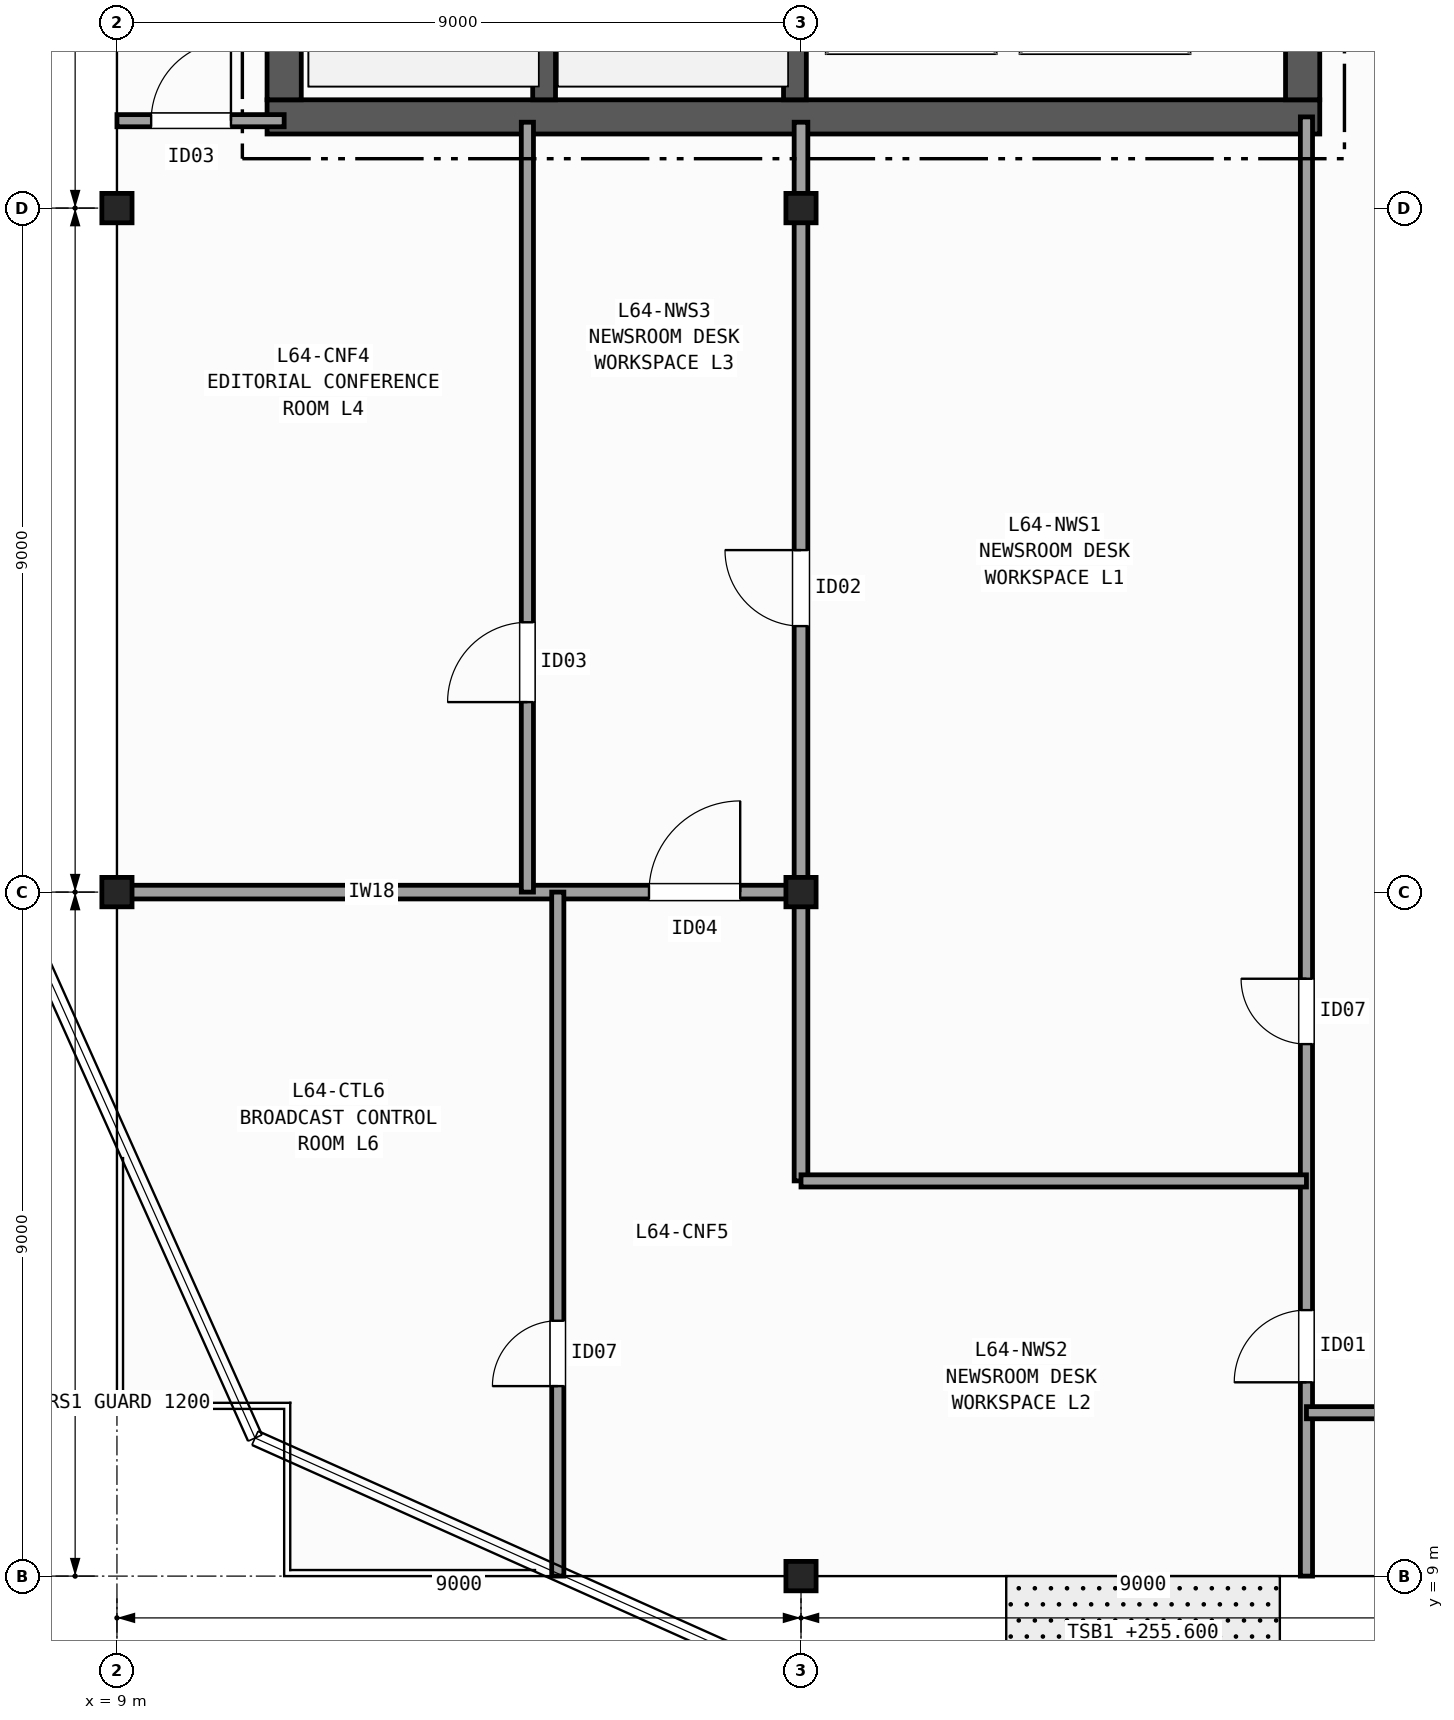
"""IFC4 building model, lengths in metres.
Left out: names, types, materials, properties, quantities, classifications, styles, units other than length and angle.
Written with IfcOpenShell. Run it as: python <this file> out.ifc"""

import sys

from ifc_helpers import new_model, si_unit, direction, frame, frame_2d, origin, origin_2d, place, context, subcontext, project, spatial, rectangle, i_section, extrude, element, fill, save


model = new_model("IFC4")
c1 = context("Model", 3, precision=1e-05, world=origin(), true_north=direction((0.0, 1.0)))
c2 = subcontext(c1, "Body", "Model", "MODEL_VIEW")
j1 = project(units=[si_unit("LENGTHUNIT", "METRE"), si_unit("PLANEANGLEUNIT", "RADIAN")], contexts=[c1])
p1 = place(None, origin())
s1 = spatial("IfcSite", under=j1, at=p1, CompositionType="ELEMENT")
p2 = place(p1, origin())
s2 = spatial("IfcBuilding", under=s1, at=p2, CompositionType="ELEMENT")
p3 = place(p2, frame((0.0, 0.0, 255.6)))
s3 = spatial("IfcBuildingStorey", under=s2, at=p3, CompositionType="ELEMENT", Elevation=255.6)
for number, where, z_axis, x_axis in (
    (1, (9.0, 18.0, 0.0), (0.0, 0.0, 1.0), (1.0, 0.0, 0.0)),
    (2, (9.0, 27.0, 0.0), (0.0, 0.0, 1.0), (1.0, 0.0, 0.0)),
    (3, (18.0, 9.0, 0.0), (0.0, 0.0, 1.0), (1.0, 0.0, 0.0)),
    (4, (18.0, 18.0, 0.0), (0.0, 0.0, 1.0), (1.0, 0.0, 0.0)),
    (5, (18.0, 27.0, 0.0), (0.0, 0.0, 1.0), (1.0, 0.0, 0.0)),
):
    element("IfcColumn", number, at=place(p3, frame(where, z_axis=z_axis, x_axis=x_axis)), inside=s3, PredefinedType="COLUMN", context=c2, shape_type="SweptSolid", body=[
        extrude(i_section(OverallWidth=0.397, OverallDepth=0.387, WebThickness=0.021, FlangeThickness=0.033, FilletRadius=0.015, at=origin_2d()), origin(), (0.0, 0.0, 1.0), 3.7),
    ])
p4 = place(p3, frame((10.975, 28.2, 0.0), z_axis=(0.0, 0.0, 1.0), x_axis=(1.0, 0.0, 0.0)))
e6 = element("IfcWall", 6, at=p4, inside=s3, PredefinedType="SHEAR", context=c2, shape_type="SweptSolid", body=[
    extrude(rectangle(XDim=13.85, YDim=0.45, at=frame_2d((6.925, 0.0))), origin(), (0.0, 0.0, 1.0), 3.42),
])
p5 = place(p3, frame((11.2, 42.175, 0.0), z_axis=(0.0, 0.0, 1.0), x_axis=(0.0, -1.0, 0.0)))
e7 = element("IfcWall", 7, at=p5, inside=s3, PredefinedType="SHEAR", context=c2, shape_type="SweptSolid", body=[
    extrude(rectangle(XDim=13.75, YDim=0.45, at=frame_2d((6.875, 0.0))), origin(), (0.0, 0.0, 1.0), 3.42),
])
p6 = place(p3, frame((24.6, 28.425, 0.0), z_axis=(0.0, 0.0, 1.0), x_axis=(0.0, 1.0, 0.0)))
e8 = element("IfcWall", 8, at=p6, inside=s3, PredefinedType="SHEAR", context=c2, shape_type="SweptSolid", body=[
    extrude(rectangle(XDim=13.75, YDim=0.45, at=frame_2d((6.875, 0.0))), origin(), (0.0, 0.0, 1.0), 3.42),
])
p7 = place(p6, frame((3.375, 0.0, 0.0)))
e9 = element("IfcOpeningElement", 9, at=p7, cuts=e8, PredefinedType="OPENING", context=c2, shape_type="SweptSolid", body=[
    extrude(rectangle(XDim=1.5, YDim=2.2, at=frame_2d((0.75, 1.1))), frame((0.0, 0.235, 0.0), z_axis=(0.0, -1.0, 0.0), x_axis=(1.0, 0.0, 0.0)), (0.0, 0.0, 1.0), 0.47),
])
p8 = place(p6, frame((9.975, 0.0, 0.0)))
e10 = element("IfcOpeningElement", 10, at=p8, cuts=e8, PredefinedType="OPENING", context=c2, shape_type="SweptSolid", body=[
    extrude(rectangle(XDim=0.9, YDim=2.1, at=frame_2d((0.45, 1.05))), frame((0.0, 0.235, 0.0), z_axis=(0.0, -1.0, 0.0), x_axis=(1.0, 0.0, 0.0)), (0.0, 0.0, 1.0), 0.47),
])
p9 = place(p3, frame((14.62, 28.425, 0.0), z_axis=(0.0, 0.0, 1.0), x_axis=(0.0, 1.0, 0.0)))
e11 = element("IfcWall", 11, at=p9, inside=s3, PredefinedType="SHEAR", context=c2, shape_type="SweptSolid", body=[
    extrude(rectangle(XDim=9.025, YDim=0.3, at=frame_2d((4.512, 0.0))), origin(), (0.0, 0.0, 1.0), 3.42),
])
p10 = place(p3, frame((17.92, 42.175, 0.0), z_axis=(0.0, 0.0, 1.0), x_axis=(0.0, -1.0, 0.0)))
e12 = element("IfcWall", 12, at=p10, inside=s3, PredefinedType="SHEAR", context=c2, shape_type="SweptSolid", body=[
    extrude(rectangle(XDim=13.75, YDim=0.3, at=frame_2d((6.875, 0.0))), origin(), (0.0, 0.0, 1.0), 3.42),
])
p11 = place(p10, frame((2.0, 0.0, 0.0)))
e13 = element("IfcOpeningElement", 13, at=p11, cuts=e12, PredefinedType="OPENING", context=c2, shape_type="SweptSolid", body=[
    extrude(rectangle(XDim=1.15, YDim=2.15, at=frame_2d((0.575, 1.075))), frame((0.0, 0.16, 0.0), z_axis=(0.0, -1.0, 0.0), x_axis=(1.0, 0.0, 0.0)), (0.0, 0.0, 1.0), 0.32),
])
p12 = place(p3, frame((9.0, 28.15, 0.0), z_axis=(0.0, 0.0, 1.0), x_axis=(1.0, 0.0, 0.0)))
e14 = element("IfcWall", 14, at=p12, inside=s3, PredefinedType="PARTITIONING", context=c2, shape_type="SweptSolid", body=[
    extrude(rectangle(XDim=2.2, YDim=0.16, at=frame_2d((1.1, 0.0))), origin(), (0.0, 0.0, 1.0), 2.707),
])
p13 = place(p12, frame((0.45, 0.0, 0.0)))
e15 = element("IfcOpeningElement", 15, at=p13, cuts=e14, PredefinedType="OPENING", context=c2, shape_type="SweptSolid", body=[
    extrude(rectangle(XDim=1.05, YDim=2.15, at=frame_2d((0.525, 1.075))), frame((0.0, 0.09, 0.0), z_axis=(0.0, -1.0, 0.0), x_axis=(1.0, 0.0, 0.0)), (0.0, 0.0, 1.0), 0.18),
])
p14 = place(p3, frame((24.65, 9.0, 0.0), z_axis=(0.0, 0.0, 1.0), x_axis=(0.0, 1.0, 0.0)))
e16 = element("IfcWall", 16, at=p14, inside=s3, PredefinedType="PARTITIONING", context=c2, shape_type="SweptSolid", body=[
    extrude(rectangle(XDim=19.2, YDim=0.16, at=frame_2d((9.6, 0.0))), origin(), (0.0, 0.0, 1.0), 2.707),
])
p15 = place(p14, frame((7.0, 0.0, 0.0)))
e17 = element("IfcOpeningElement", 17, at=p15, cuts=e16, PredefinedType="OPENING", context=c2, shape_type="SweptSolid", body=[
    extrude(rectangle(XDim=0.86, YDim=2.05, at=frame_2d((0.43, 1.025))), frame((0.0, 0.09, 0.0), z_axis=(0.0, -1.0, 0.0), x_axis=(1.0, 0.0, 0.0)), (0.0, 0.0, 1.0), 0.18),
])
p16 = place(p14, frame((2.55, 0.0, 0.0)))
e18 = element("IfcOpeningElement", 18, at=p16, cuts=e16, PredefinedType="OPENING", context=c2, shape_type="SweptSolid", body=[
    extrude(rectangle(XDim=0.95, YDim=2.1, at=frame_2d((0.475, 1.05))), frame((0.0, 0.09, 0.0), z_axis=(0.0, -1.0, 0.0), x_axis=(1.0, 0.0, 0.0)), (0.0, 0.0, 1.0), 0.18),
])
p17 = place(p3, frame((9.0, 18.0, 0.0), z_axis=(0.0, 0.0, 1.0), x_axis=(1.0, 0.0, 0.0)))
e19 = element("IfcWall", 19, at=p17, inside=s3, PredefinedType="PARTITIONING", context=c2, shape_type="SweptSolid", body=[
    extrude(rectangle(XDim=9.08, YDim=0.18, at=frame_2d((4.54, 0.0))), origin(), (0.0, 0.0, 1.0), 2.707),
])
p18 = place(p17, frame((7.0, 0.0, 0.0)))
e20 = element("IfcOpeningElement", 20, at=p18, cuts=e19, PredefinedType="OPENING", context=c2, shape_type="SweptSolid", body=[
    extrude(rectangle(XDim=1.2, YDim=2.15, at=frame_2d((0.6, 1.075))), frame((0.0, 0.1, 0.0), z_axis=(0.0, -1.0, 0.0), x_axis=(1.0, 0.0, 0.0)), (0.0, 0.0, 1.0), 0.2),
])
p19 = place(p3, frame((18.0, 14.2, 0.0), z_axis=(0.0, 0.0, 1.0), x_axis=(0.0, 1.0, 0.0)))
e21 = element("IfcWall", 21, at=p19, inside=s3, PredefinedType="PARTITIONING", context=c2, shape_type="SweptSolid", body=[
    extrude(rectangle(XDim=13.93, YDim=0.18, at=frame_2d((6.965, 0.0))), origin(), (0.0, 0.0, 1.0), 2.789),
])
p20 = place(p19, frame((7.3, 0.0, 0.0)))
e22 = element("IfcOpeningElement", 22, at=p20, cuts=e21, PredefinedType="OPENING", context=c2, shape_type="SweptSolid", body=[
    extrude(rectangle(XDim=1.0, YDim=2.1, at=frame_2d((0.5, 1.05))), frame((0.0, 0.1, 0.0), z_axis=(0.0, -1.0, 0.0), x_axis=(1.0, 0.0, 0.0)), (0.0, 0.0, 1.0), 0.2),
])
p21 = place(p3, frame((18.0, 14.2, 0.0), z_axis=(0.0, 0.0, 1.0), x_axis=(1.0, 0.0, 0.0)))
e23 = element("IfcWall", 23, at=p21, inside=s3, PredefinedType="PARTITIONING", context=c2, shape_type="SweptSolid", body=[
    extrude(rectangle(XDim=6.65, YDim=0.16, at=frame_2d((3.325, 0.0))), origin(), (0.0, 0.0, 1.0), 2.792),
])
p22 = place(p3, frame((14.4, 18.0, 0.0), z_axis=(0.0, 0.0, 1.0), x_axis=(0.0, 1.0, 0.0)))
e24 = element("IfcWall", 24, at=p22, inside=s3, PredefinedType="PARTITIONING", context=c2, shape_type="SweptSolid", body=[
    extrude(rectangle(XDim=10.13, YDim=0.16, at=frame_2d((5.065, 0.0))), origin(), (0.0, 0.0, 1.0), 2.789),
])
p23 = place(p22, frame((2.5, 0.0, 0.0)))
e25 = element("IfcOpeningElement", 25, at=p23, cuts=e24, PredefinedType="OPENING", context=c2, shape_type="SweptSolid", body=[
    extrude(rectangle(XDim=1.05, YDim=2.15, at=frame_2d((0.525, 1.075))), frame((0.0, 0.09, 0.0), z_axis=(0.0, -1.0, 0.0), x_axis=(1.0, 0.0, 0.0)), (0.0, 0.0, 1.0), 0.18),
])
p24 = place(p3, frame((14.8, 9.0, 0.0), z_axis=(0.0, 0.0, 1.0), x_axis=(0.0, 1.0, 0.0)))
e26 = element("IfcWall", 26, at=p24, inside=s3, PredefinedType="PARTITIONING", context=c2, shape_type="SweptSolid", body=[
    extrude(rectangle(XDim=9.0, YDim=0.16, at=frame_2d((4.5, 0.0))), origin(), (0.0, 0.0, 1.0), 2.789),
])
p25 = place(p24, frame((2.5, 0.0, 0.0)))
e27 = element("IfcOpeningElement", 27, at=p25, cuts=e26, PredefinedType="OPENING", context=c2, shape_type="SweptSolid", body=[
    extrude(rectangle(XDim=0.86, YDim=2.05, at=frame_2d((0.43, 1.025))), frame((0.0, 0.09, 0.0), z_axis=(0.0, -1.0, 0.0), x_axis=(1.0, 0.0, 0.0)), (0.0, 0.0, 1.0), 0.18),
])
p26 = place(p3, frame((24.65, 11.15, 0.0), z_axis=(0.0, 0.0, 1.0), x_axis=(1.0, 0.0, 0.0)))
e28 = element("IfcWall", 28, at=p26, inside=s3, PredefinedType="PARTITIONING", context=c2, shape_type="SweptSolid", body=[
    extrude(rectangle(XDim=4.75, YDim=0.16, at=frame_2d((2.375, 0.0))), origin(), (0.0, 0.0, 1.0), 2.792),
])
p27 = place(p26, frame((1.2, 0.0, 0.0)))
e29 = element("IfcOpeningElement", 29, at=p27, cuts=e28, PredefinedType="OPENING", context=c2, shape_type="SweptSolid", body=[
    extrude(rectangle(XDim=0.95, YDim=2.1, at=frame_2d((0.475, 1.05))), frame((0.0, 0.09, 0.0), z_axis=(0.0, -1.0, 0.0), x_axis=(1.0, 0.0, 0.0)), (0.0, 0.0, 1.0), 0.18),
])
p28 = place(p13, origin())
e30 = element("IfcDoor", 30, at=p28, inside=s3, OperationType="SINGLE_SWING_RIGHT", PredefinedType="DOOR", context=c2, shape_type="SweptSolid", body=[
    extrude(rectangle(XDim=1.05, YDim=2.15, at=frame_2d((0.525, 1.075))), frame((0.0, 0.025, 0.0), z_axis=(0.0, -1.0, 0.0), x_axis=(1.0, 0.0, 0.0)), (0.0, 0.0, 1.0), 0.05),
])
fill(e15, e30)
p29 = place(p15, origin())
e31 = element("IfcDoor", 31, at=p29, inside=s3, OperationType="SINGLE_SWING_RIGHT", PredefinedType="DOOR", context=c2, shape_type="SweptSolid", body=[
    extrude(rectangle(XDim=0.86, YDim=2.05, at=frame_2d((0.43, 1.025))), frame((0.0, 0.025, 0.0), z_axis=(0.0, -1.0, 0.0), x_axis=(1.0, 0.0, 0.0)), (0.0, 0.0, 1.0), 0.05),
])
fill(e17, e31)
p30 = place(p16, origin())
e32 = element("IfcDoor", 32, at=p30, inside=s3, OperationType="SINGLE_SWING_LEFT", PredefinedType="DOOR", context=c2, shape_type="SweptSolid", body=[
    extrude(rectangle(XDim=0.95, YDim=2.1, at=frame_2d((0.475, 1.05))), frame((0.0, 0.025, 0.0), z_axis=(0.0, -1.0, 0.0), x_axis=(1.0, 0.0, 0.0)), (0.0, 0.0, 1.0), 0.05),
])
fill(e18, e32)
p31 = place(p20, origin())
e33 = element("IfcDoor", 33, at=p31, inside=s3, OperationType="SINGLE_SWING_RIGHT", PredefinedType="DOOR", context=c2, shape_type="SweptSolid", body=[
    extrude(rectangle(XDim=1.0, YDim=2.1, at=frame_2d((0.5, 1.05))), frame((0.0, 0.025, 0.0), z_axis=(0.0, -1.0, 0.0), x_axis=(1.0, 0.0, 0.0)), (0.0, 0.0, 1.0), 0.05),
])
fill(e22, e33)
p32 = place(p23, origin())
e34 = element("IfcDoor", 34, at=p32, inside=s3, OperationType="SINGLE_SWING_LEFT", PredefinedType="DOOR", context=c2, shape_type="SweptSolid", body=[
    extrude(rectangle(XDim=1.05, YDim=2.15, at=frame_2d((0.525, 1.075))), frame((0.0, 0.025, 0.0), z_axis=(0.0, -1.0, 0.0), x_axis=(1.0, 0.0, 0.0)), (0.0, 0.0, 1.0), 0.05),
])
fill(e25, e34)
p33 = place(p18, origin())
e35 = element("IfcDoor", 35, at=p33, inside=s3, OperationType="SINGLE_SWING_RIGHT", PredefinedType="DOOR", context=c2, shape_type="SweptSolid", body=[
    extrude(rectangle(XDim=1.2, YDim=2.15, at=frame_2d((0.6, 1.075))), frame((0.0, 0.025, 0.0), z_axis=(0.0, -1.0, 0.0), x_axis=(1.0, 0.0, 0.0)), (0.0, 0.0, 1.0), 0.05),
])
fill(e20, e35)
p34 = place(p25, origin())
e36 = element("IfcDoor", 36, at=p34, inside=s3, OperationType="SINGLE_SWING_LEFT", PredefinedType="DOOR", context=c2, shape_type="SweptSolid", body=[
    extrude(rectangle(XDim=0.86, YDim=2.05, at=frame_2d((0.43, 1.025))), frame((0.0, 0.025, 0.0), z_axis=(0.0, -1.0, 0.0), x_axis=(1.0, 0.0, 0.0)), (0.0, 0.0, 1.0), 0.05),
])
fill(e27, e36)
save(model, sys.argv[1])
